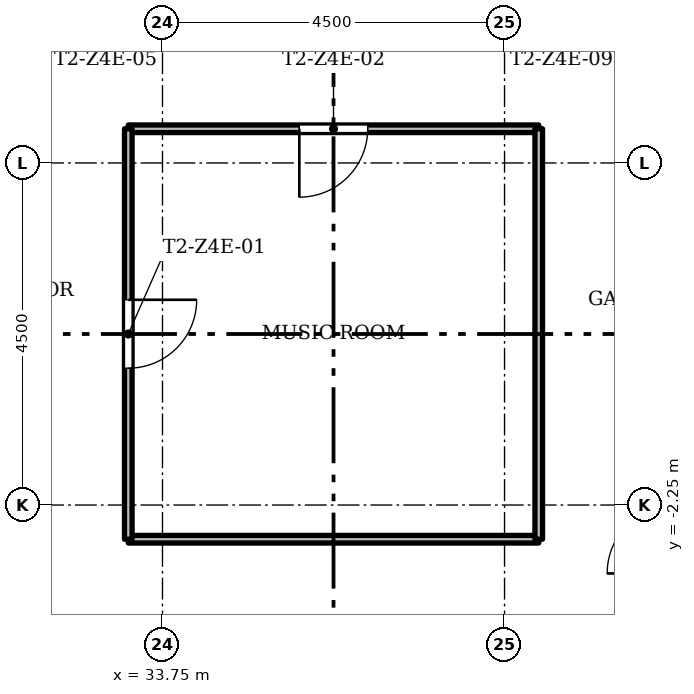
"""IFC4 building model, lengths in metres.
Left out: names, types, materials, properties, quantities, classifications, styles, units other than length and angle.
Written with IfcOpenShell. Run it as: python <this file> out.ifc"""

import sys

from ifc_helpers import new_model, si_unit, direction, frame, frame_2d, origin, place, context, subcontext, project, spatial, rectangle, extrude, element, fill, save


model = new_model("IFC4")
c1 = context("Model", 3, precision=1e-05, world=origin(), true_north=direction((0.0, 1.0)))
c2 = subcontext(c1, "Body", "Model", "MODEL_VIEW")
j1 = project(units=[si_unit("LENGTHUNIT", "METRE"), si_unit("PLANEANGLEUNIT", "RADIAN")], contexts=[c1])
p1 = place(None, origin())
s1 = spatial("IfcSite", under=j1, at=p1, CompositionType="ELEMENT")
p2 = place(p1, origin())
s2 = spatial("IfcBuilding", under=s1, at=p2, CompositionType="ELEMENT")
p3 = place(p2, frame((0.0, 0.0, 209.6)))
s3 = spatial("IfcBuildingStorey", under=s2, at=p3, CompositionType="ELEMENT", Elevation=209.6)
p4 = place(p3, frame((38.7, -2.7, 0.0), z_axis=(0.0, 0.0, 1.0), x_axis=(-1.0, 0.0, 0.0)))
e1 = element("IfcWall", 1, at=p4, inside=s3, PredefinedType="PARTITIONING", context=c2, shape_type="SweptSolid", body=[
    extrude(rectangle(XDim=5.4, YDim=0.1, at=frame_2d((2.7, 0.0))), origin(), (0.0, 0.0, 1.0), 3.0),
])
p5 = place(p3, frame((38.7, 2.7, 0.0), z_axis=(0.0, 0.0, 1.0), x_axis=(-1.0, 0.0, 0.0)))
e2 = element("IfcWall", 2, at=p5, inside=s3, PredefinedType="PARTITIONING", context=c2, shape_type="SweptSolid", body=[
    extrude(rectangle(XDim=5.4, YDim=0.1, at=frame_2d((2.7, 0.0))), origin(), (0.0, 0.0, 1.0), 3.0),
])
p6 = place(p5, frame((2.25, 0.0, 0.0)))
e3 = element("IfcOpeningElement", 3, at=p6, cuts=e2, PredefinedType="OPENING", context=c2, shape_type="SweptSolid", body=[
    extrude(rectangle(XDim=0.9, YDim=2.1, at=frame_2d((0.45, 1.05))), frame((0.0, 0.06, 0.0), z_axis=(0.0, -1.0, 0.0), x_axis=(1.0, 0.0, 0.0)), (0.0, 0.0, 1.0), 0.12),
])
p7 = place(p3, frame((38.7, -2.7, 0.0), z_axis=(0.0, 0.0, 1.0), x_axis=(0.0, 1.0, 0.0)))
e4 = element("IfcWall", 4, at=p7, inside=s3, PredefinedType="PARTITIONING", context=c2, shape_type="SweptSolid", body=[
    extrude(rectangle(XDim=5.4, YDim=0.1, at=frame_2d((2.7, 0.0))), origin(), (0.0, 0.0, 1.0), 3.0),
])
p8 = place(p3, frame((33.3, -2.7, 0.0), z_axis=(0.0, 0.0, 1.0), x_axis=(0.0, 1.0, 0.0)))
e5 = element("IfcWall", 5, at=p8, inside=s3, PredefinedType="PARTITIONING", context=c2, shape_type="SweptSolid", body=[
    extrude(rectangle(XDim=5.4, YDim=0.1, at=frame_2d((2.7, 0.0))), origin(), (0.0, 0.0, 1.0), 3.0),
])
p9 = place(p8, frame((2.25, 0.0, 0.0)))
e6 = element("IfcOpeningElement", 6, at=p9, cuts=e5, PredefinedType="OPENING", context=c2, shape_type="SweptSolid", body=[
    extrude(rectangle(XDim=0.9, YDim=2.1, at=frame_2d((0.45, 1.05))), frame((0.0, 0.06, 0.0), z_axis=(0.0, -1.0, 0.0), x_axis=(1.0, 0.0, 0.0)), (0.0, 0.0, 1.0), 0.12),
])
p10 = place(p9, origin())
e7 = element("IfcDoor", 7, at=p10, inside=s3, OperationType="SINGLE_SWING_RIGHT", PredefinedType="DOOR", context=c2, shape_type="SweptSolid", body=[
    extrude(rectangle(XDim=0.9, YDim=2.1, at=frame_2d((0.45, 1.05))), frame((0.0, 0.025, 0.0), z_axis=(0.0, -1.0, 0.0), x_axis=(1.0, 0.0, 0.0)), (0.0, 0.0, 1.0), 0.05),
])
fill(e6, e7)
p11 = place(p6, origin())
e8 = element("IfcDoor", 8, at=p11, inside=s3, OperationType="SINGLE_SWING_LEFT", PredefinedType="DOOR", context=c2, shape_type="SweptSolid", body=[
    extrude(rectangle(XDim=0.9, YDim=2.1, at=frame_2d((0.45, 1.05))), frame((0.0, 0.025, 0.0), z_axis=(0.0, -1.0, 0.0), x_axis=(1.0, 0.0, 0.0)), (0.0, 0.0, 1.0), 0.05),
])
fill(e3, e8)
save(model, sys.argv[1])
